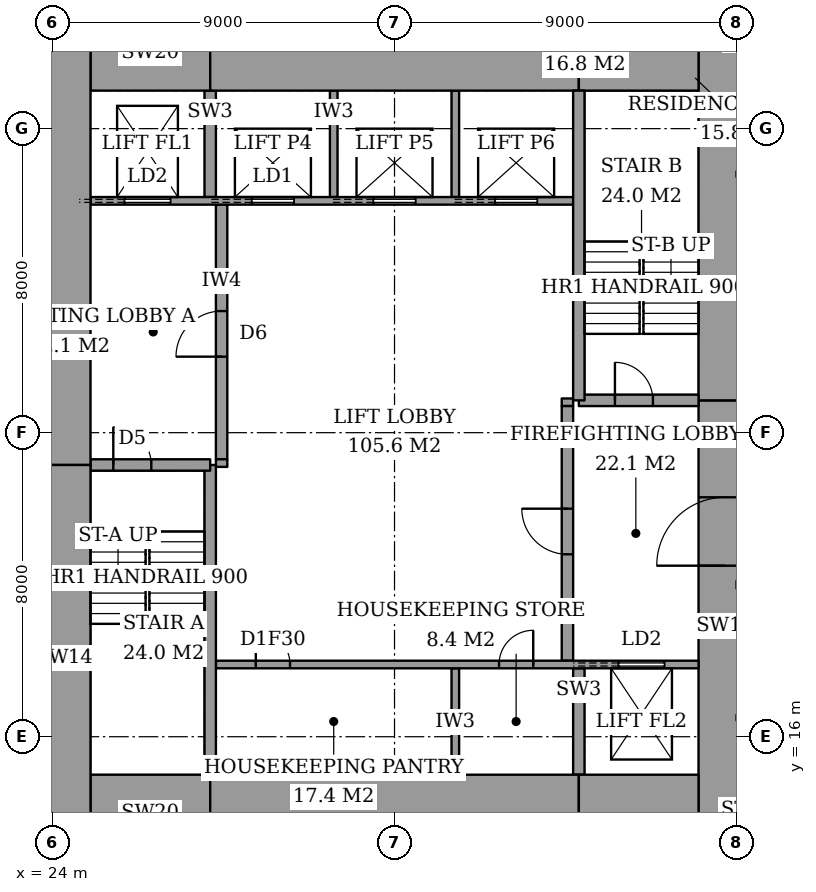
"""IFC4 building model, lengths in metres.
Left out: names, types, materials, properties, quantities, classifications, styles, units other than length and angle.
Written with IfcOpenShell. Run it as: python <this file> out.ifc"""

import sys

from ifc_helpers import new_model, si_unit, direction, frame, frame_2d, origin, place, context, subcontext, project, spatial, rectangle, extrude, element, fill, save


model = new_model("IFC4")
c1 = context("Model", 3, precision=1e-05, world=origin(), true_north=direction((0.0, 1.0)))
c2 = subcontext(c1, "Body", "Model", "MODEL_VIEW")
j1 = project(units=[si_unit("LENGTHUNIT", "METRE"), si_unit("PLANEANGLEUNIT", "RADIAN")], contexts=[c1])
p1 = place(None, origin())
s1 = spatial("IfcSite", under=j1, at=p1, CompositionType="ELEMENT")
p2 = place(p1, origin())
s2 = spatial("IfcBuilding", under=s1, at=p2, CompositionType="ELEMENT")
p3 = place(p2, frame((0.0, 0.0, 248.4)))
s3 = spatial("IfcBuildingStorey", under=s2, at=p3, CompositionType="ELEMENT", Elevation=248.4)
p4 = place(p3, frame((25.0, 14.0, 0.0), z_axis=(0.0, 0.0, 1.0), x_axis=(1.0, 0.0, 0.0)))
e1 = element("IfcWall", 1, at=p4, inside=s3, PredefinedType="SHEAR", context=c2, shape_type="SweptSolid", body=[
    extrude(rectangle(XDim=3.15, YDim=2.0, at=frame_2d((1.575, 0.0))), origin(), (0.0, 0.0, 1.0), 3.6),
])
p5 = place(p3, frame((28.15, 14.0, 0.0), z_axis=(0.0, 0.0, 1.0), x_axis=(1.0, 0.0, 0.0)))
e2 = element("IfcWall", 2, at=p5, inside=s3, PredefinedType="SHEAR", context=c2, shape_type="SweptSolid", body=[
    extrude(rectangle(XDim=9.7, YDim=2.0, at=frame_2d((4.85, 0.0))), origin(), (0.0, 0.0, 1.0), 3.6),
])
for number, where, z_axis, x_axis in (
    (3, (37.85, 14.0, 0.0), (0.0, 0.0, 1.0), (1.0, 0.0, 0.0)),
    (4, (25.0, 34.0, 0.0), (0.0, 0.0, 1.0), (1.0, 0.0, 0.0)),
):
    element("IfcWall", number, at=place(p3, frame(where, z_axis=z_axis, x_axis=x_axis)), inside=s3, PredefinedType="SHEAR", context=c2, shape_type="SweptSolid", body=[
        extrude(rectangle(XDim=3.15, YDim=2.0, at=frame_2d((1.575, 0.0))), origin(), (0.0, 0.0, 1.0), 3.6),
    ])
p6 = place(p3, frame((28.15, 34.0, 0.0), z_axis=(0.0, 0.0, 1.0), x_axis=(1.0, 0.0, 0.0)))
e5 = element("IfcWall", 5, at=p6, inside=s3, PredefinedType="SHEAR", context=c2, shape_type="SweptSolid", body=[
    extrude(rectangle(XDim=9.7, YDim=2.0, at=frame_2d((4.85, 0.0))), origin(), (0.0, 0.0, 1.0), 3.6),
])
p7 = place(p3, frame((37.85, 34.0, 0.0), z_axis=(0.0, 0.0, 1.0), x_axis=(1.0, 0.0, 0.0)))
e6 = element("IfcWall", 6, at=p7, inside=s3, PredefinedType="SHEAR", context=c2, shape_type="SweptSolid", body=[
    extrude(rectangle(XDim=3.15, YDim=2.0, at=frame_2d((1.575, 0.0))), origin(), (0.0, 0.0, 1.0), 3.6),
])
p8 = place(p3, frame((24.3, 13.0, 0.0), z_axis=(0.0, 0.0, 1.0), x_axis=(0.0, 1.0, 0.0)))
e7 = element("IfcWall", 7, at=p8, inside=s3, PredefinedType="SHEAR", context=c2, shape_type="SweptSolid", body=[
    extrude(rectangle(XDim=10.15, YDim=1.4, at=frame_2d((5.075, 0.0))), origin(), (0.0, 0.0, 1.0), 3.6),
])
p9 = place(p3, frame((24.3, 23.15, 0.0), z_axis=(0.0, 0.0, 1.0), x_axis=(0.0, 1.0, 0.0)))
e8 = element("IfcWall", 8, at=p9, inside=s3, PredefinedType="SHEAR", context=c2, shape_type="SweptSolid", body=[
    extrude(rectangle(XDim=11.85, YDim=1.4, at=frame_2d((5.925, 0.0))), origin(), (0.0, 0.0, 1.0), 3.6),
])
p10 = place(p3, frame((41.7, 13.0, 0.0), z_axis=(0.0, 0.0, 1.0), x_axis=(0.0, 1.0, 0.0)))
e9 = element("IfcWall", 9, at=p10, inside=s3, PredefinedType="SHEAR", context=c2, shape_type="SweptSolid", body=[
    extrude(rectangle(XDim=11.85, YDim=1.4, at=frame_2d((5.925, 0.0))), origin(), (0.0, 0.0, 1.0), 3.6),
])
p11 = place(p10, frame((7.5, 0.0, 0.0)))
e10 = element("IfcOpeningElement", 10, at=p11, cuts=e9, PredefinedType="OPENING", context=c2, shape_type="SweptSolid", body=[
    extrude(rectangle(XDim=1.8, YDim=2.4, at=frame_2d((0.9, 1.2))), frame((0.0, 0.71, 0.0), z_axis=(0.0, -1.0, 0.0), x_axis=(1.0, 0.0, 0.0)), (0.0, 0.0, 1.0), 1.42),
])
p12 = place(p3, frame((41.7, 24.85, 0.0), z_axis=(0.0, 0.0, 1.0), x_axis=(0.0, 1.0, 0.0)))
e11 = element("IfcWall", 11, at=p12, inside=s3, PredefinedType="SHEAR", context=c2, shape_type="SweptSolid", body=[
    extrude(rectangle(XDim=10.15, YDim=1.4, at=frame_2d((5.075, 0.0))), origin(), (0.0, 0.0, 1.0), 3.6),
])
p13 = place(p3, frame((28.15, 15.0, 0.0), z_axis=(0.0, 0.0, 1.0), x_axis=(0.0, 1.0, 0.0)))
e12 = element("IfcWall", 12, at=p13, inside=s3, PredefinedType="SHEAR", context=c2, shape_type="SweptSolid", body=[
    extrude(rectangle(XDim=8.15, YDim=0.3, at=frame_2d((4.075, 0.0))), origin(), (0.0, 0.0, 1.0), 3.6),
])
p14 = place(p3, frame((25.0, 23.15, 0.0), z_axis=(0.0, 0.0, 1.0), x_axis=(1.0, 0.0, 0.0)))
e13 = element("IfcWall", 13, at=p14, inside=s3, PredefinedType="SHEAR", context=c2, shape_type="SweptSolid", body=[
    extrude(rectangle(XDim=3.15, YDim=0.3, at=frame_2d((1.575, 0.0))), origin(), (0.0, 0.0, 1.0), 3.6),
])
p15 = place(p14, frame((0.6, 0.0, 0.0)))
e14 = element("IfcOpeningElement", 14, at=p15, cuts=e13, PredefinedType="OPENING", context=c2, shape_type="SweptSolid", body=[
    extrude(rectangle(XDim=1.0, YDim=2.1, at=frame_2d((0.5, 1.05))), frame((0.0, 0.16, 0.0), z_axis=(0.0, -1.0, 0.0), x_axis=(1.0, 0.0, 0.0)), (0.0, 0.0, 1.0), 0.32),
])
p16 = place(p3, frame((37.85, 24.85, 0.0), z_axis=(0.0, 0.0, 1.0), x_axis=(0.0, 1.0, 0.0)))
e15 = element("IfcWall", 15, at=p16, inside=s3, PredefinedType="SHEAR", context=c2, shape_type="SweptSolid", body=[
    extrude(rectangle(XDim=8.15, YDim=0.3, at=frame_2d((4.075, 0.0))), origin(), (0.0, 0.0, 1.0), 3.6),
])
p17 = place(p3, frame((37.85, 24.85, 0.0), z_axis=(0.0, 0.0, 1.0), x_axis=(1.0, 0.0, 0.0)))
e16 = element("IfcWall", 16, at=p17, inside=s3, PredefinedType="SHEAR", context=c2, shape_type="SweptSolid", body=[
    extrude(rectangle(XDim=3.15, YDim=0.3, at=frame_2d((1.575, 0.0))), origin(), (0.0, 0.0, 1.0), 3.6),
])
p18 = place(p17, frame((0.95, 0.0, 0.0)))
e17 = element("IfcOpeningElement", 17, at=p18, cuts=e16, PredefinedType="OPENING", context=c2, shape_type="SweptSolid", body=[
    extrude(rectangle(XDim=1.0, YDim=2.1, at=frame_2d((0.5, 1.05))), frame((0.0, 0.16, 0.0), z_axis=(0.0, -1.0, 0.0), x_axis=(1.0, 0.0, 0.0)), (0.0, 0.0, 1.0), 0.32),
])
p19 = place(p3, frame((28.45, 23.3, 0.0), z_axis=(0.0, 0.0, 1.0), x_axis=(0.0, 1.0, 0.0)))
e18 = element("IfcWall", 18, at=p19, inside=s3, PredefinedType="PARTITIONING", context=c2, shape_type="SweptSolid", body=[
    extrude(rectangle(XDim=6.7, YDim=0.3, at=frame_2d((3.35, 0.0))), origin(), (0.0, 0.0, 1.0), 3.6),
])
p20 = place(p19, frame((2.7, 0.0, 0.0)))
e19 = element("IfcOpeningElement", 19, at=p20, cuts=e18, PredefinedType="OPENING", context=c2, shape_type="SweptSolid", body=[
    extrude(rectangle(XDim=1.2, YDim=2.1, at=frame_2d((0.6, 1.05))), frame((0.0, 0.16, 0.0), z_axis=(0.0, -1.0, 0.0), x_axis=(1.0, 0.0, 0.0)), (0.0, 0.0, 1.0), 0.32),
])
p21 = place(p3, frame((37.55, 18.0, 0.0), z_axis=(0.0, 0.0, 1.0), x_axis=(0.0, 1.0, 0.0)))
e20 = element("IfcWall", 20, at=p21, inside=s3, PredefinedType="PARTITIONING", context=c2, shape_type="SweptSolid", body=[
    extrude(rectangle(XDim=6.7, YDim=0.3, at=frame_2d((3.35, 0.0))), origin(), (0.0, 0.0, 1.0), 3.6),
])
p22 = place(p21, frame((2.8, 0.0, 0.0)))
e21 = element("IfcOpeningElement", 21, at=p22, cuts=e20, PredefinedType="OPENING", context=c2, shape_type="SweptSolid", body=[
    extrude(rectangle(XDim=1.2, YDim=2.1, at=frame_2d((0.6, 1.05))), frame((0.0, 0.16, 0.0), z_axis=(0.0, -1.0, 0.0), x_axis=(1.0, 0.0, 0.0)), (0.0, 0.0, 1.0), 0.32),
])
p23 = place(p3, frame((28.3, 17.9, 0.0), z_axis=(0.0, 0.0, 1.0), x_axis=(1.0, 0.0, 0.0)))
e22 = element("IfcWall", 22, at=p23, inside=s3, PredefinedType="PARTITIONING", context=c2, shape_type="SweptSolid", body=[
    extrude(rectangle(XDim=12.7, YDim=0.2, at=frame_2d((6.35, 0.0))), origin(), (0.0, 0.0, 1.0), 3.6),
])
p24 = place(p23, frame((1.05, 0.0, 0.0)))
e23 = element("IfcOpeningElement", 23, at=p24, cuts=e22, PredefinedType="OPENING", context=c2, shape_type="SweptSolid", body=[
    extrude(rectangle(XDim=0.9, YDim=2.1, at=frame_2d((0.45, 1.05))), frame((0.0, 0.11, 0.0), z_axis=(0.0, -1.0, 0.0), x_axis=(1.0, 0.0, 0.0)), (0.0, 0.0, 1.0), 0.22),
])
p25 = place(p23, frame((7.45, 0.0, 0.0)))
e24 = element("IfcOpeningElement", 24, at=p25, cuts=e22, PredefinedType="OPENING", context=c2, shape_type="SweptSolid", body=[
    extrude(rectangle(XDim=0.9, YDim=2.1, at=frame_2d((0.45, 1.05))), frame((0.0, 0.11, 0.0), z_axis=(0.0, -1.0, 0.0), x_axis=(1.0, 0.0, 0.0)), (0.0, 0.0, 1.0), 0.22),
])
p26 = place(p23, frame((10.6, 0.0, 0.0)))
e25 = element("IfcOpeningElement", 25, at=p26, cuts=e22, PredefinedType="OPENING", context=c2, shape_type="SweptSolid", body=[
    extrude(rectangle(XDim=1.2, YDim=2.1, at=frame_2d((0.6, 1.05))), frame((0.0, 0.11, 0.0), z_axis=(0.0, -1.0, 0.0), x_axis=(1.0, 0.0, 0.0)), (0.0, 0.0, 1.0), 0.22),
])
p27 = place(p3, frame((25.0, 30.1, 0.0), z_axis=(0.0, 0.0, 1.0), x_axis=(1.0, 0.0, 0.0)))
e26 = element("IfcWall", 26, at=p27, inside=s3, PredefinedType="PARTITIONING", context=c2, shape_type="SweptSolid", body=[
    extrude(rectangle(XDim=12.7, YDim=0.2, at=frame_2d((6.35, 0.0))), origin(), (0.0, 0.0, 1.0), 3.6),
])
p28 = place(p27, frame((4.25, 0.0, 0.0)))
e27 = element("IfcOpeningElement", 27, at=p28, cuts=e26, PredefinedType="OPENING", context=c2, shape_type="SweptSolid", body=[
    extrude(rectangle(XDim=1.1, YDim=2.1, at=frame_2d((0.55, 1.05))), frame((0.0, 0.11, 0.0), z_axis=(0.0, -1.0, 0.0), x_axis=(1.0, 0.0, 0.0)), (0.0, 0.0, 1.0), 0.22),
])
p29 = place(p27, frame((7.45, 0.0, 0.0)))
e28 = element("IfcOpeningElement", 28, at=p29, cuts=e26, PredefinedType="OPENING", context=c2, shape_type="SweptSolid", body=[
    extrude(rectangle(XDim=1.1, YDim=2.1, at=frame_2d((0.55, 1.05))), frame((0.0, 0.11, 0.0), z_axis=(0.0, -1.0, 0.0), x_axis=(1.0, 0.0, 0.0)), (0.0, 0.0, 1.0), 0.22),
])
p30 = place(p27, frame((10.65, 0.0, 0.0)))
e29 = element("IfcOpeningElement", 29, at=p30, cuts=e26, PredefinedType="OPENING", context=c2, shape_type="SweptSolid", body=[
    extrude(rectangle(XDim=1.1, YDim=2.1, at=frame_2d((0.55, 1.05))), frame((0.0, 0.11, 0.0), z_axis=(0.0, -1.0, 0.0), x_axis=(1.0, 0.0, 0.0)), (0.0, 0.0, 1.0), 0.22),
])
p31 = place(p27, frame((0.9, 0.0, 0.0)))
e30 = element("IfcOpeningElement", 30, at=p31, cuts=e26, PredefinedType="OPENING", context=c2, shape_type="SweptSolid", body=[
    extrude(rectangle(XDim=1.2, YDim=2.1, at=frame_2d((0.6, 1.05))), frame((0.0, 0.11, 0.0), z_axis=(0.0, -1.0, 0.0), x_axis=(1.0, 0.0, 0.0)), (0.0, 0.0, 1.0), 0.22),
])
p32 = place(p3, frame((34.6, 15.0, 0.0), z_axis=(0.0, 0.0, 1.0), x_axis=(0.0, 1.0, 0.0)))
e31 = element("IfcWall", 31, at=p32, inside=s3, PredefinedType="PARTITIONING", context=c2, shape_type="SweptSolid", body=[
    extrude(rectangle(XDim=2.8, YDim=0.2, at=frame_2d((1.4, 0.0))), origin(), (0.0, 0.0, 1.0), 3.6),
])
p33 = place(p3, frame((37.85, 15.0, 0.0), z_axis=(0.0, 0.0, 1.0), x_axis=(0.0, 1.0, 0.0)))
e32 = element("IfcWall", 32, at=p33, inside=s3, PredefinedType="SHEAR", context=c2, shape_type="SweptSolid", body=[
    extrude(rectangle(XDim=2.8, YDim=0.3, at=frame_2d((1.4, 0.0))), origin(), (0.0, 0.0, 1.0), 3.6),
])
for number, where, z_axis, x_axis in (
    (33, (31.4, 30.2, 0.0), (0.0, 0.0, 1.0), (0.0, 1.0, 0.0)),
    (34, (34.6, 30.2, 0.0), (0.0, 0.0, 1.0), (0.0, 1.0, 0.0)),
):
    element("IfcWall", number, at=place(p3, frame(where, z_axis=z_axis, x_axis=x_axis)), inside=s3, PredefinedType="PARTITIONING", context=c2, shape_type="SweptSolid", body=[
        extrude(rectangle(XDim=2.8, YDim=0.2, at=frame_2d((1.4, 0.0))), origin(), (0.0, 0.0, 1.0), 3.6),
    ])
p34 = place(p3, frame((28.15, 30.2, 0.0), z_axis=(0.0, 0.0, 1.0), x_axis=(0.0, 1.0, 0.0)))
e35 = element("IfcWall", 35, at=p34, inside=s3, PredefinedType="SHEAR", context=c2, shape_type="SweptSolid", body=[
    extrude(rectangle(XDim=2.8, YDim=0.3, at=frame_2d((1.4, 0.0))), origin(), (0.0, 0.0, 1.0), 3.6),
])
for number, where, z_axis, x_axis in (
    (36, (28.3, 23.2, 0.0), (0.0, 0.0, 1.0), (1.0, 0.0, 0.0)),
    (37, (37.4, 24.8, 0.0), (0.0, 0.0, 1.0), (1.0, 0.0, 0.0)),
):
    element("IfcWall", number, at=place(p3, frame(where, z_axis=z_axis, x_axis=x_axis)), inside=s3, PredefinedType="PARTITIONING", context=c2, shape_type="SweptSolid", body=[
        extrude(rectangle(XDim=0.3, YDim=0.2, at=frame_2d((0.15, 0.0))), origin(), (0.0, 0.0, 1.0), 3.6),
    ])
p35 = place(p15, origin())
e38 = element("IfcDoor", 38, at=p35, inside=s3, OperationType="SINGLE_SWING_RIGHT", PredefinedType="DOOR", context=c2, shape_type="SweptSolid", body=[
    extrude(rectangle(XDim=1.0, YDim=2.1, at=frame_2d((0.5, 1.05))), frame((0.0, 0.025, 0.0), z_axis=(0.0, -1.0, 0.0), x_axis=(1.0, 0.0, 0.0)), (0.0, 0.0, 1.0), 0.05),
])
fill(e14, e38)
p36 = place(p18, origin())
e39 = element("IfcDoor", 39, at=p36, inside=s3, OperationType="SINGLE_SWING_RIGHT", PredefinedType="DOOR", context=c2, shape_type="SweptSolid", body=[
    extrude(rectangle(XDim=1.0, YDim=2.1, at=frame_2d((0.5, 1.05))), frame((0.0, 0.025, 0.0), z_axis=(0.0, -1.0, 0.0), x_axis=(1.0, 0.0, 0.0)), (0.0, 0.0, 1.0), 0.05),
])
fill(e17, e39)
p37 = place(p20, origin())
e40 = element("IfcDoor", 40, at=p37, inside=s3, OperationType="SINGLE_SWING_RIGHT", PredefinedType="DOOR", context=c2, shape_type="SweptSolid", body=[
    extrude(rectangle(XDim=1.2, YDim=2.1, at=frame_2d((0.6, 1.05))), frame((0.0, 0.025, 0.0), z_axis=(0.0, -1.0, 0.0), x_axis=(1.0, 0.0, 0.0)), (0.0, 0.0, 1.0), 0.05),
])
fill(e19, e40)
p38 = place(p22, origin())
e41 = element("IfcDoor", 41, at=p38, inside=s3, OperationType="SINGLE_SWING_LEFT", PredefinedType="DOOR", context=c2, shape_type="SweptSolid", body=[
    extrude(rectangle(XDim=1.2, YDim=2.1, at=frame_2d((0.6, 1.05))), frame((0.0, 0.025, 0.0), z_axis=(0.0, -1.0, 0.0), x_axis=(1.0, 0.0, 0.0)), (0.0, 0.0, 1.0), 0.05),
])
fill(e21, e41)
p39 = place(p11, origin())
e42 = element("IfcDoor", 42, at=p39, inside=s3, OperationType="DOUBLE_DOOR_DOUBLE_SWING", PredefinedType="DOOR", context=c2, shape_type="SweptSolid", body=[
    extrude(rectangle(XDim=1.8, YDim=2.4, at=frame_2d((0.9, 1.2))), frame((0.0, 0.025, 0.0), z_axis=(0.0, -1.0, 0.0), x_axis=(1.0, 0.0, 0.0)), (0.0, 0.0, 1.0), 0.05),
])
fill(e10, e42)
p40 = place(p24, origin())
e43 = element("IfcDoor", 43, at=p40, inside=s3, OperationType="SINGLE_SWING_RIGHT", PredefinedType="DOOR", context=c2, shape_type="SweptSolid", body=[
    extrude(rectangle(XDim=0.9, YDim=2.1, at=frame_2d((0.45, 1.05))), frame((0.0, 0.025, 0.0), z_axis=(0.0, -1.0, 0.0), x_axis=(1.0, 0.0, 0.0)), (0.0, 0.0, 1.0), 0.05),
])
fill(e23, e43)
p41 = place(p25, origin())
e44 = element("IfcDoor", 44, at=p41, inside=s3, OperationType="SINGLE_SWING_LEFT", PredefinedType="DOOR", context=c2, shape_type="SweptSolid", body=[
    extrude(rectangle(XDim=0.9, YDim=2.1, at=frame_2d((0.45, 1.05))), frame((0.0, 0.025, 0.0), z_axis=(0.0, -1.0, 0.0), x_axis=(1.0, 0.0, 0.0)), (0.0, 0.0, 1.0), 0.05),
])
fill(e24, e44)
p42 = place(p28, origin())
e45 = element("IfcDoor", 45, at=p42, inside=s3, OperationType="SLIDING_TO_LEFT", PredefinedType="DOOR", context=c2, shape_type="SweptSolid", body=[
    extrude(rectangle(XDim=1.1, YDim=2.1, at=frame_2d((0.55, 1.05))), frame((0.0, 0.025, 0.0), z_axis=(0.0, -1.0, 0.0), x_axis=(1.0, 0.0, 0.0)), (0.0, 0.0, 1.0), 0.05),
])
fill(e27, e45)
p43 = place(p29, origin())
e46 = element("IfcDoor", 46, at=p43, inside=s3, OperationType="SLIDING_TO_LEFT", PredefinedType="DOOR", context=c2, shape_type="SweptSolid", body=[
    extrude(rectangle(XDim=1.1, YDim=2.1, at=frame_2d((0.55, 1.05))), frame((0.0, 0.025, 0.0), z_axis=(0.0, -1.0, 0.0), x_axis=(1.0, 0.0, 0.0)), (0.0, 0.0, 1.0), 0.05),
])
fill(e28, e46)
p44 = place(p30, origin())
e47 = element("IfcDoor", 47, at=p44, inside=s3, OperationType="SLIDING_TO_LEFT", PredefinedType="DOOR", context=c2, shape_type="SweptSolid", body=[
    extrude(rectangle(XDim=1.1, YDim=2.1, at=frame_2d((0.55, 1.05))), frame((0.0, 0.025, 0.0), z_axis=(0.0, -1.0, 0.0), x_axis=(1.0, 0.0, 0.0)), (0.0, 0.0, 1.0), 0.05),
])
fill(e29, e47)
p45 = place(p31, origin())
e48 = element("IfcDoor", 48, at=p45, inside=s3, OperationType="SLIDING_TO_LEFT", PredefinedType="DOOR", context=c2, shape_type="SweptSolid", body=[
    extrude(rectangle(XDim=1.2, YDim=2.1, at=frame_2d((0.6, 1.05))), frame((0.0, 0.025, 0.0), z_axis=(0.0, -1.0, 0.0), x_axis=(1.0, 0.0, 0.0)), (0.0, 0.0, 1.0), 0.05),
])
fill(e30, e48)
p46 = place(p26, origin())
e49 = element("IfcDoor", 49, at=p46, inside=s3, OperationType="SLIDING_TO_LEFT", PredefinedType="DOOR", context=c2, shape_type="SweptSolid", body=[
    extrude(rectangle(XDim=1.2, YDim=2.1, at=frame_2d((0.6, 1.05))), frame((0.0, 0.025, 0.0), z_axis=(0.0, -1.0, 0.0), x_axis=(1.0, 0.0, 0.0)), (0.0, 0.0, 1.0), 0.05),
])
fill(e25, e49)
save(model, sys.argv[1])
